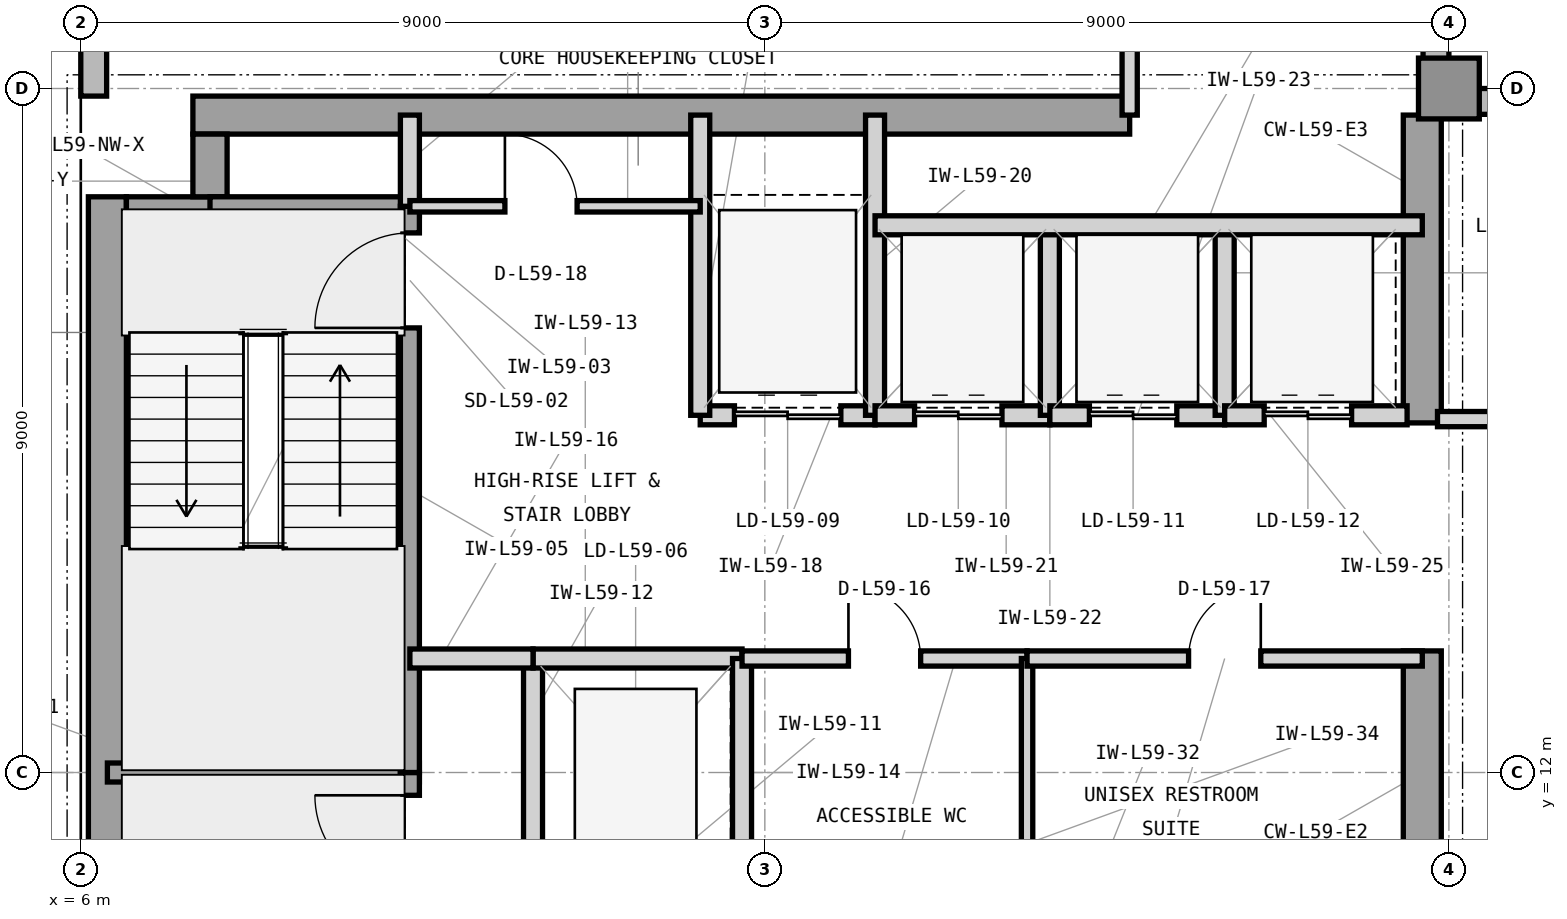
"""IFC4 building model, lengths in metres.
Left out: names, types, materials, properties, quantities, classifications, styles, units other than length and angle.
Written with IfcOpenShell. Run it as: python <this file> out.ifc"""

import sys

from ifc_helpers import new_model, si_unit, direction, frame, frame_2d, origin, origin_2d, place, context, subcontext, project, spatial, rectangle, extrude, element, fill, save


model = new_model("IFC4")
c1 = context("Model", 3, precision=1e-05, world=origin(), true_north=direction((0.0, 1.0)))
c2 = subcontext(c1, "Body", "Model", "MODEL_VIEW")
j1 = project(units=[si_unit("LENGTHUNIT", "METRE"), si_unit("PLANEANGLEUNIT", "RADIAN")], contexts=[c1])
p1 = place(None, origin())
s1 = spatial("IfcSite", under=j1, at=p1, CompositionType="ELEMENT")
p2 = place(p1, origin())
s2 = spatial("IfcBuilding", under=s1, at=p2, CompositionType="ELEMENT")
p3 = place(p2, frame((0.0, 0.0, 243.0)))
s3 = spatial("IfcBuildingStorey", under=s2, at=p3, CompositionType="ELEMENT", Elevation=243.0)
p4 = place(p3, frame((6.35, 4.425, 0.0), z_axis=(0.0, 0.0, 1.0), x_axis=(0.0, 1.0, 0.0)))
e1 = element("IfcWall", 1, at=p4, inside=s3, PredefinedType="SHEAR", context=c2, shape_type="SweptSolid", body=[
    extrude(rectangle(XDim=15.15, YDim=0.5, at=frame_2d((7.575, 0.0))), origin(), (0.0, 0.0, 1.0), 3.9),
])
p5 = place(p3, frame((7.475, 20.65, 0.0), z_axis=(0.0, 0.0, 1.0), x_axis=(1.0, 0.0, 0.0)))
e2 = element("IfcWall", 2, at=p5, inside=s3, PredefinedType="SHEAR", context=c2, shape_type="SweptSolid", body=[
    extrude(rectangle(XDim=12.325, YDim=0.5, at=frame_2d((6.163, 0.0))), origin(), (0.0, 0.0, 1.0), 3.9),
])
p6 = place(p3, frame((23.65, 10.4, 0.0), z_axis=(0.0, 0.0, 1.0), x_axis=(0.0, 1.0, 0.0)))
e3 = element("IfcWall", 3, at=p6, inside=s3, PredefinedType="SHEAR", context=c2, shape_type="SweptSolid", body=[
    extrude(rectangle(XDim=3.2, YDim=0.5, at=frame_2d((1.6, 0.0))), origin(), (0.0, 0.0, 1.0), 3.9),
])
p7 = place(p3, frame((23.65, 16.6, 0.0), z_axis=(0.0, 0.0, 1.0), x_axis=(0.0, 1.0, 0.0)))
e4 = element("IfcWall", 4, at=p7, inside=s3, PredefinedType="SHEAR", context=c2, shape_type="SweptSolid", body=[
    extrude(rectangle(XDim=4.05, YDim=0.5, at=frame_2d((2.025, 0.0))), origin(), (0.0, 0.0, 1.0), 3.9),
])
p8 = place(p3, frame((6.6, 19.35, 0.0), z_axis=(0.0, 0.0, 1.0), x_axis=(1.0, 0.0, 0.0)))
e5 = element("IfcWall", 5, at=p8, inside=s3, PredefinedType="SHEAR", context=c2, shape_type="SweptSolid", body=[
    extrude(rectangle(XDim=1.325, YDim=0.45, at=frame_2d((0.663, 0.0))), origin(), (0.0, 0.0, 1.0), 3.9),
])
p9 = place(p3, frame((7.7, 19.575, 0.0), z_axis=(0.0, 0.0, 1.0), x_axis=(0.0, 1.0, 0.0)))
e6 = element("IfcWall", 6, at=p9, inside=s3, PredefinedType="SHEAR", context=c2, shape_type="SweptSolid", body=[
    extrude(rectangle(XDim=0.825, YDim=0.45, at=frame_2d((0.413, 0.0))), origin(), (0.0, 0.0, 1.0), 3.9),
])
p10 = place(p3, frame((24.0, 21.0, 0.0), z_axis=(0.0, 0.0, 1.0), x_axis=(1.0, 0.0, 0.0)))
e7 = element("IfcColumn", 7, at=p10, inside=s3, PredefinedType="COLUMN", context=c2, shape_type="SweptSolid", body=[
    extrude(rectangle(XDim=0.8, YDim=0.8, at=origin_2d()), origin(), (0.0, 0.0, 1.0), 3.9),
])
p11 = place(p3, frame((52.4, 20.83, 0.0), z_axis=(0.0, 0.0, 1.0), x_axis=(-1.0, 0.0, 0.0)))
e8 = element("IfcWall", 8, at=p11, inside=s3, PredefinedType="STANDARD", context=c2, shape_type="SweptSolid", body=[
    extrude(rectangle(XDim=28.4, YDim=0.34, at=frame_2d((14.2, 0.0))), origin(), (0.0, 0.0, 1.0), 3.7),
])
p12 = place(p11, frame((26.096, 0.0, 0.9)))
e9 = element("IfcOpeningElement", 9, at=p12, cuts=e8, PredefinedType="OPENING", context=c2, shape_type="SweptSolid", body=[
    extrude(rectangle(XDim=1.6, YDim=2.2, at=frame_2d((0.8, 1.1))), frame((0.0, 0.18, 0.0), z_axis=(0.0, -1.0, 0.0), x_axis=(1.0, 0.0, 0.0)), (0.0, 0.0, 1.0), 0.36),
])
p13 = place(p11, frame((11.375, 0.0, 0.9)))
e10 = element("IfcOpeningElement", 10, at=p13, cuts=e8, PredefinedType="OPENING", context=c2, shape_type="SweptSolid", body=[
    extrude(rectangle(XDim=2.3, YDim=2.2, at=frame_2d((1.15, 1.1))), frame((0.0, 0.18, 0.0), z_axis=(0.0, -1.0, 0.0), x_axis=(1.0, 0.0, 0.0)), (0.0, 0.0, 1.0), 0.36),
])
p14 = place(p3, frame((23.83, 21.0, 0.0), z_axis=(0.0, 0.0, 1.0), x_axis=(0.0, 1.0, 0.0)))
e11 = element("IfcWall", 11, at=p14, inside=s3, PredefinedType="STANDARD", context=c2, shape_type="SweptSolid", body=[
    extrude(rectangle(XDim=19.4, YDim=0.34, at=frame_2d((9.7, 0.0))), origin(), (0.0, 0.0, 1.0), 3.7),
])
p15 = place(p14, frame((10.975, 0.0, 0.9)))
e12 = element("IfcOpeningElement", 12, at=p15, cuts=e11, PredefinedType="OPENING", context=c2, shape_type="SweptSolid", body=[
    extrude(rectangle(XDim=2.3, YDim=2.2, at=frame_2d((1.15, 1.1))), frame((0.0, 0.18, 0.0), z_axis=(0.0, -1.0, 0.0), x_axis=(1.0, 0.0, 0.0)), (0.0, 0.0, 1.0), 0.36),
])
p16 = place(p3, frame((6.17, 40.4, 0.0), z_axis=(0.0, 0.0, 1.0), x_axis=(0.0, -1.0, 0.0)))
e13 = element("IfcWall", 13, at=p16, inside=s3, PredefinedType="STANDARD", context=c2, shape_type="SweptSolid", body=[
    extrude(rectangle(XDim=19.5, YDim=0.34, at=frame_2d((9.75, 0.0))), origin(), (0.0, 0.0, 1.0), 3.7),
])
p17 = place(p16, frame((6.163, 0.0, 0.9)))
e14 = element("IfcOpeningElement", 14, at=p17, cuts=e13, PredefinedType="OPENING", context=c2, shape_type="SweptSolid", body=[
    extrude(rectangle(XDim=2.3, YDim=2.2, at=frame_2d((1.15, 1.1))), frame((0.0, 0.18, 0.0), z_axis=(0.0, -1.0, 0.0), x_axis=(1.0, 0.0, 0.0)), (0.0, 0.0, 1.0), 0.36),
])
p18 = place(p3, frame((6.35, 12.0, 0.0), z_axis=(0.0, 0.0, 1.0), x_axis=(1.0, 0.0, 0.0)))
e15 = element("IfcWall", 15, at=p18, inside=s3, PredefinedType="SHEAR", context=c2, shape_type="SweptSolid", body=[
    extrude(rectangle(XDim=4.105, YDim=0.25, at=frame_2d((2.052, 0.0))), origin(), (0.0, 0.0, 1.0), 3.9),
])
p19 = place(p3, frame((7.7, 19.45, 0.0), z_axis=(0.0, 0.0, 1.0), x_axis=(1.0, 0.0, 0.0)))
e16 = element("IfcWall", 16, at=p19, inside=s3, PredefinedType="SHEAR", context=c2, shape_type="SweptSolid", body=[
    extrude(rectangle(XDim=2.755, YDim=0.25, at=frame_2d((1.377, 0.0))), origin(), (0.0, 0.0, 1.0), 3.9),
])
p20 = place(p3, frame((10.33, 4.55, 0.0), z_axis=(0.0, 0.0, 1.0), x_axis=(0.0, 1.0, 0.0)))
e17 = element("IfcWall", 17, at=p20, inside=s3, PredefinedType="SHEAR", context=c2, shape_type="SweptSolid", body=[
    extrude(rectangle(XDim=7.45, YDim=0.25, at=frame_2d((3.725, 0.0))), origin(), (0.0, 0.0, 1.0), 3.9),
])
p21 = place(p20, frame((5.9, 0.0, 0.0)))
e18 = element("IfcOpeningElement", 18, at=p21, cuts=e17, PredefinedType="OPENING", context=c2, shape_type="SweptSolid", body=[
    extrude(rectangle(XDim=1.25, YDim=2.2, at=frame_2d((0.625, 1.1))), frame((0.0, 0.135, 0.0), z_axis=(0.0, -1.0, 0.0), x_axis=(1.0, 0.0, 0.0)), (0.0, 0.0, 1.0), 0.27),
])
p22 = place(p3, frame((10.33, 12.0, 0.0), z_axis=(0.0, 0.0, 1.0), x_axis=(0.0, 1.0, 0.0)))
e19 = element("IfcWall", 19, at=p22, inside=s3, PredefinedType="SHEAR", context=c2, shape_type="SweptSolid", body=[
    extrude(rectangle(XDim=7.45, YDim=0.25, at=frame_2d((3.725, 0.0))), origin(), (0.0, 0.0, 1.0), 3.9),
])
p23 = place(p22, frame((5.85, 0.0, 0.0)))
e20 = element("IfcOpeningElement", 20, at=p23, cuts=e19, PredefinedType="OPENING", context=c2, shape_type="SweptSolid", body=[
    extrude(rectangle(XDim=1.25, YDim=2.2, at=frame_2d((0.625, 1.1))), frame((0.0, 0.135, 0.0), z_axis=(0.0, -1.0, 0.0), x_axis=(1.0, 0.0, 0.0)), (0.0, 0.0, 1.0), 0.27),
])
p24 = place(p3, frame((10.33, 19.45, 0.0), z_axis=(0.0, 0.0, 1.0), x_axis=(0.0, 1.0, 0.0)))
e21 = element("IfcWall", 21, at=p24, inside=s3, PredefinedType="PARTITIONING", context=c2, shape_type="SweptSolid", body=[
    extrude(rectangle(XDim=1.2, YDim=0.25, at=frame_2d((0.6, 0.0))), origin(), (0.0, 0.0, 1.0), 3.69),
])
p25 = place(p3, frame((11.95, 10.5, 0.0), z_axis=(0.0, 0.0, 1.0), x_axis=(0.0, 1.0, 0.0)))
e22 = element("IfcWall", 22, at=p25, inside=s3, PredefinedType="PARTITIONING", context=c2, shape_type="SweptSolid", body=[
    extrude(rectangle(XDim=3.0, YDim=0.25, at=frame_2d((1.5, 0.0))), origin(), (0.0, 0.0, 1.0), 3.69),
])
p26 = place(p3, frame((11.95, 13.5, 0.0), z_axis=(0.0, 0.0, 1.0), x_axis=(1.0, 0.0, 0.0)))
e23 = element("IfcWall", 23, at=p26, inside=s3, PredefinedType="PARTITIONING", context=c2, shape_type="SweptSolid", body=[
    extrude(rectangle(XDim=2.75, YDim=0.25, at=frame_2d((1.375, 0.0))), origin(), (0.0, 0.0, 1.0), 3.073),
])
p27 = place(p3, frame((14.7, 10.5, 0.0), z_axis=(0.0, 0.0, 1.0), x_axis=(0.0, 1.0, 0.0)))
e24 = element("IfcWall", 24, at=p27, inside=s3, PredefinedType="PARTITIONING", context=c2, shape_type="SweptSolid", body=[
    extrude(rectangle(XDim=3.0, YDim=0.25, at=frame_2d((1.5, 0.0))), origin(), (0.0, 0.0, 1.0), 3.69),
])
p28 = place(p3, frame((10.33, 13.5, 0.0), z_axis=(0.0, 0.0, 1.0), x_axis=(1.0, 0.0, 0.0)))
e25 = element("IfcWall", 25, at=p28, inside=s3, PredefinedType="PARTITIONING", context=c2, shape_type="SweptSolid", body=[
    extrude(rectangle(XDim=1.62, YDim=0.25, at=frame_2d((0.81, 0.0))), origin(), (0.0, 0.0, 1.0), 3.073),
])
p29 = place(p3, frame((14.15, 16.7, 0.0), z_axis=(0.0, 0.0, 1.0), x_axis=(1.0, 0.0, 0.0)))
e26 = element("IfcWall", 26, at=p29, inside=s3, PredefinedType="PARTITIONING", context=c2, shape_type="SweptSolid", body=[
    extrude(rectangle(XDim=2.3, YDim=0.25, at=frame_2d((1.15, 0.0))), origin(), (0.0, 0.0, 1.0), 3.073),
])
p30 = place(p29, frame((0.45, 0.0, 0.0)))
e27 = element("IfcOpeningElement", 27, at=p30, cuts=e26, PredefinedType="OPENING", context=c2, shape_type="SweptSolid", body=[
    extrude(rectangle(XDim=1.4, YDim=2.35, at=frame_2d((0.7, 1.175))), frame((0.0, 0.135, 0.0), z_axis=(0.0, -1.0, 0.0), x_axis=(1.0, 0.0, 0.0)), (0.0, 0.0, 1.0), 0.27),
])
for number, where, z_axis, x_axis in (
    (28, (14.15, 16.7, 0.0), (0.0, 0.0, 1.0), (0.0, 1.0, 0.0)),
    (29, (16.45, 16.7, 0.0), (0.0, 0.0, 1.0), (0.0, 1.0, 0.0)),
):
    element("IfcWall", number, at=place(p3, frame(where, z_axis=z_axis, x_axis=x_axis)), inside=s3, PredefinedType="PARTITIONING", context=c2, shape_type="SweptSolid", body=[
        extrude(rectangle(XDim=3.95, YDim=0.25, at=frame_2d((1.975, 0.0))), origin(), (0.0, 0.0, 1.0), 3.69),
    ])
p31 = place(p3, frame((16.45, 16.7, 0.0), z_axis=(0.0, 0.0, 1.0), x_axis=(1.0, 0.0, 0.0)))
e30 = element("IfcWall", 30, at=p31, inside=s3, PredefinedType="PARTITIONING", context=c2, shape_type="SweptSolid", body=[
    extrude(rectangle(XDim=2.3, YDim=0.25, at=frame_2d((1.15, 0.0))), origin(), (0.0, 0.0, 1.0), 3.073),
])
p32 = place(p31, frame((0.52, 0.0, 0.0)))
e31 = element("IfcOpeningElement", 31, at=p32, cuts=e30, PredefinedType="OPENING", context=c2, shape_type="SweptSolid", body=[
    extrude(rectangle(XDim=1.15, YDim=2.25, at=frame_2d((0.575, 1.125))), frame((0.0, 0.135, 0.0), z_axis=(0.0, -1.0, 0.0), x_axis=(1.0, 0.0, 0.0)), (0.0, 0.0, 1.0), 0.27),
])
p33 = place(p3, frame((18.75, 16.7, 0.0), z_axis=(0.0, 0.0, 1.0), x_axis=(0.0, 1.0, 0.0)))
e32 = element("IfcWall", 32, at=p33, inside=s3, PredefinedType="PARTITIONING", context=c2, shape_type="SweptSolid", body=[
    extrude(rectangle(XDim=2.5, YDim=0.25, at=frame_2d((1.25, 0.0))), origin(), (0.0, 0.0, 1.0), 3.69),
])
p34 = place(p3, frame((18.75, 16.7, 0.0), z_axis=(0.0, 0.0, 1.0), x_axis=(1.0, 0.0, 0.0)))
e33 = element("IfcWall", 33, at=p34, inside=s3, PredefinedType="PARTITIONING", context=c2, shape_type="SweptSolid", body=[
    extrude(rectangle(XDim=2.3, YDim=0.25, at=frame_2d((1.15, 0.0))), origin(), (0.0, 0.0, 1.0), 3.073),
])
p35 = place(p34, frame((0.52, 0.0, 0.0)))
e34 = element("IfcOpeningElement", 34, at=p35, cuts=e33, PredefinedType="OPENING", context=c2, shape_type="SweptSolid", body=[
    extrude(rectangle(XDim=1.15, YDim=2.25, at=frame_2d((0.575, 1.125))), frame((0.0, 0.135, 0.0), z_axis=(0.0, -1.0, 0.0), x_axis=(1.0, 0.0, 0.0)), (0.0, 0.0, 1.0), 0.27),
])
p36 = place(p3, frame((21.05, 16.7, 0.0), z_axis=(0.0, 0.0, 1.0), x_axis=(0.0, 1.0, 0.0)))
e35 = element("IfcWall", 35, at=p36, inside=s3, PredefinedType="PARTITIONING", context=c2, shape_type="SweptSolid", body=[
    extrude(rectangle(XDim=2.5, YDim=0.25, at=frame_2d((1.25, 0.0))), origin(), (0.0, 0.0, 1.0), 3.69),
])
p37 = place(p3, frame((21.05, 16.7, 0.0), z_axis=(0.0, 0.0, 1.0), x_axis=(1.0, 0.0, 0.0)))
e36 = element("IfcWall", 36, at=p37, inside=s3, PredefinedType="PARTITIONING", context=c2, shape_type="SweptSolid", body=[
    extrude(rectangle(XDim=2.4, YDim=0.25, at=frame_2d((1.2, 0.0))), origin(), (0.0, 0.0, 1.0), 3.073),
])
p38 = place(p37, frame((0.52, 0.0, 0.0)))
e37 = element("IfcOpeningElement", 37, at=p38, cuts=e36, PredefinedType="OPENING", context=c2, shape_type="SweptSolid", body=[
    extrude(rectangle(XDim=1.15, YDim=2.25, at=frame_2d((0.575, 1.125))), frame((0.0, 0.135, 0.0), z_axis=(0.0, -1.0, 0.0), x_axis=(1.0, 0.0, 0.0)), (0.0, 0.0, 1.0), 0.27),
])
p39 = place(p3, frame((16.45, 19.2, 0.0), z_axis=(0.0, 0.0, 1.0), x_axis=(1.0, 0.0, 0.0)))
e38 = element("IfcWall", 38, at=p39, inside=s3, PredefinedType="PARTITIONING", context=c2, shape_type="SweptSolid", body=[
    extrude(rectangle(XDim=7.2, YDim=0.25, at=frame_2d((3.6, 0.0))), origin(), (0.0, 0.0, 1.0), 3.69),
])
p40 = place(p3, frame((14.7, 13.5, 0.0), z_axis=(0.0, 0.0, 1.0), x_axis=(1.0, 0.0, 0.0)))
e39 = element("IfcWall", 39, at=p40, inside=s3, PredefinedType="PARTITIONING", context=c2, shape_type="SweptSolid", body=[
    extrude(rectangle(XDim=3.75, YDim=0.2, at=frame_2d((1.875, 0.0))), origin(), (0.0, 0.0, 1.0), 3.073),
])
p41 = place(p40, frame((1.4, 0.0, 0.0)))
e40 = element("IfcOpeningElement", 40, at=p41, cuts=e39, PredefinedType="OPENING", context=c2, shape_type="SweptSolid", body=[
    extrude(rectangle(XDim=0.95, YDim=2.1, at=frame_2d((0.475, 1.05))), frame((0.0, 0.11, 0.0), z_axis=(0.0, -1.0, 0.0), x_axis=(1.0, 0.0, 0.0)), (0.0, 0.0, 1.0), 0.22),
])
p42 = place(p3, frame((18.45, 10.25, 0.0), z_axis=(0.0, 0.0, 1.0), x_axis=(0.0, 1.0, 0.0)))
e41 = element("IfcWall", 41, at=p42, inside=s3, PredefinedType="PARTITIONING", context=c2, shape_type="SweptSolid", body=[
    extrude(rectangle(XDim=3.25, YDim=0.15, at=frame_2d((1.625, 0.0))), origin(), (0.0, 0.0, 1.0), 3.69),
])
p43 = place(p3, frame((18.45, 13.5, 0.0), z_axis=(0.0, 0.0, 1.0), x_axis=(1.0, 0.0, 0.0)))
e42 = element("IfcWall", 42, at=p43, inside=s3, PredefinedType="PARTITIONING", context=c2, shape_type="SweptSolid", body=[
    extrude(rectangle(XDim=5.2, YDim=0.2, at=frame_2d((2.6, 0.0))), origin(), (0.0, 0.0, 1.0), 3.073),
])
p44 = place(p43, frame((2.125, 0.0, 0.0)))
e43 = element("IfcOpeningElement", 43, at=p44, cuts=e42, PredefinedType="OPENING", context=c2, shape_type="SweptSolid", body=[
    extrude(rectangle(XDim=0.95, YDim=2.1, at=frame_2d((0.475, 1.05))), frame((0.0, 0.11, 0.0), z_axis=(0.0, -1.0, 0.0), x_axis=(1.0, 0.0, 0.0)), (0.0, 0.0, 1.0), 0.22),
])
p45 = place(p3, frame((10.33, 19.45, 0.0), z_axis=(0.0, 0.0, 1.0), x_axis=(1.0, 0.0, 0.0)))
e44 = element("IfcWall", 44, at=p45, inside=s3, PredefinedType="PARTITIONING", context=c2, shape_type="SweptSolid", body=[
    extrude(rectangle(XDim=3.82, YDim=0.15, at=frame_2d((1.91, 0.0))), origin(), (0.0, 0.0, 1.0), 3.69),
])
p46 = place(p45, frame((1.25, 0.0, 0.0)))
e45 = element("IfcOpeningElement", 45, at=p46, cuts=e44, PredefinedType="OPENING", context=c2, shape_type="SweptSolid", body=[
    extrude(rectangle(XDim=0.95, YDim=2.1, at=frame_2d((0.475, 1.05))), frame((0.0, 0.085, 0.0), z_axis=(0.0, -1.0, 0.0), x_axis=(1.0, 0.0, 0.0)), (0.0, 0.0, 1.0), 0.17),
])
p47 = place(p3, frame((23.85, 16.65, 0.0), z_axis=(0.0, 0.0, 1.0), x_axis=(1.0, 0.0, 0.0)))
e46 = element("IfcWall", 46, at=p47, inside=s3, PredefinedType="PARTITIONING", context=c2, shape_type="SweptSolid", body=[
    extrude(rectangle(XDim=2.85, YDim=0.2, at=frame_2d((1.425, 0.0))), origin(), (0.0, 0.0, 1.0), 3.69),
])
p48 = place(p47, frame((0.7, 0.0, 0.0)))
e47 = element("IfcOpeningElement", 47, at=p48, cuts=e46, PredefinedType="OPENING", context=c2, shape_type="SweptSolid", body=[
    extrude(rectangle(XDim=1.0, YDim=2.15, at=frame_2d((0.5, 1.075))), frame((0.0, 0.11, 0.0), z_axis=(0.0, -1.0, 0.0), x_axis=(1.0, 0.0, 0.0)), (0.0, 0.0, 1.0), 0.22),
])
p49 = place(p3, frame((19.8, 20.65, 0.0), z_axis=(0.0, 0.0, 1.0), x_axis=(0.0, 1.0, 0.0)))
e48 = element("IfcWall", 48, at=p49, inside=s3, PredefinedType="PARTITIONING", context=c2, shape_type="SweptSolid", body=[
    extrude(rectangle(XDim=6.15, YDim=0.2, at=frame_2d((3.075, 0.0))), origin(), (0.0, 0.0, 1.0), 3.69),
])
p50 = place(p21, origin())
e49 = element("IfcDoor", 49, at=p50, inside=s3, OperationType="SINGLE_SWING_RIGHT", PredefinedType="DOOR", context=c2, shape_type="SweptSolid", body=[
    extrude(rectangle(XDim=1.25, YDim=2.2, at=frame_2d((0.625, 1.1))), frame((0.0, 0.025, 0.0), z_axis=(0.0, -1.0, 0.0), x_axis=(1.0, 0.0, 0.0)), (0.0, 0.0, 1.0), 0.05),
])
fill(e18, e49)
p51 = place(p23, origin())
e50 = element("IfcDoor", 50, at=p51, inside=s3, OperationType="SINGLE_SWING_LEFT", PredefinedType="DOOR", context=c2, shape_type="SweptSolid", body=[
    extrude(rectangle(XDim=1.25, YDim=2.2, at=frame_2d((0.625, 1.1))), frame((0.0, 0.025, 0.0), z_axis=(0.0, -1.0, 0.0), x_axis=(1.0, 0.0, 0.0)), (0.0, 0.0, 1.0), 0.05),
])
fill(e20, e50)
p52 = place(p30, origin())
e51 = element("IfcDoor", 51, at=p52, inside=s3, OperationType="DOUBLE_DOOR_SLIDING", PredefinedType="DOOR", context=c2, shape_type="SweptSolid", body=[
    extrude(rectangle(XDim=1.4, YDim=2.35, at=frame_2d((0.7, 1.175))), frame((0.0, 0.025, 0.0), z_axis=(0.0, -1.0, 0.0), x_axis=(1.0, 0.0, 0.0)), (0.0, 0.0, 1.0), 0.05),
])
fill(e27, e51)
p53 = place(p32, origin())
e52 = element("IfcDoor", 52, at=p53, inside=s3, OperationType="DOUBLE_DOOR_SLIDING", PredefinedType="DOOR", context=c2, shape_type="SweptSolid", body=[
    extrude(rectangle(XDim=1.15, YDim=2.25, at=frame_2d((0.575, 1.125))), frame((0.0, 0.025, 0.0), z_axis=(0.0, -1.0, 0.0), x_axis=(1.0, 0.0, 0.0)), (0.0, 0.0, 1.0), 0.05),
])
fill(e31, e52)
p54 = place(p35, origin())
e53 = element("IfcDoor", 53, at=p54, inside=s3, OperationType="DOUBLE_DOOR_SLIDING", PredefinedType="DOOR", context=c2, shape_type="SweptSolid", body=[
    extrude(rectangle(XDim=1.15, YDim=2.25, at=frame_2d((0.575, 1.125))), frame((0.0, 0.025, 0.0), z_axis=(0.0, -1.0, 0.0), x_axis=(1.0, 0.0, 0.0)), (0.0, 0.0, 1.0), 0.05),
])
fill(e34, e53)
p55 = place(p38, origin())
e54 = element("IfcDoor", 54, at=p55, inside=s3, OperationType="DOUBLE_DOOR_SLIDING", PredefinedType="DOOR", context=c2, shape_type="SweptSolid", body=[
    extrude(rectangle(XDim=1.15, YDim=2.25, at=frame_2d((0.575, 1.125))), frame((0.0, 0.025, 0.0), z_axis=(0.0, -1.0, 0.0), x_axis=(1.0, 0.0, 0.0)), (0.0, 0.0, 1.0), 0.05),
])
fill(e37, e54)
p56 = place(p41, origin())
e55 = element("IfcDoor", 55, at=p56, inside=s3, OperationType="SINGLE_SWING_LEFT", PredefinedType="DOOR", context=c2, shape_type="SweptSolid", body=[
    extrude(rectangle(XDim=0.95, YDim=2.1, at=frame_2d((0.475, 1.05))), frame((0.0, 0.025, 0.0), z_axis=(0.0, -1.0, 0.0), x_axis=(1.0, 0.0, 0.0)), (0.0, 0.0, 1.0), 0.05),
])
fill(e40, e55)
p57 = place(p44, origin())
e56 = element("IfcDoor", 56, at=p57, inside=s3, OperationType="SINGLE_SWING_RIGHT", PredefinedType="DOOR", context=c2, shape_type="SweptSolid", body=[
    extrude(rectangle(XDim=0.95, YDim=2.1, at=frame_2d((0.475, 1.05))), frame((0.0, 0.025, 0.0), z_axis=(0.0, -1.0, 0.0), x_axis=(1.0, 0.0, 0.0)), (0.0, 0.0, 1.0), 0.05),
])
fill(e43, e56)
p58 = place(p46, origin())
e57 = element("IfcDoor", 57, at=p58, inside=s3, OperationType="SINGLE_SWING_LEFT", PredefinedType="DOOR", context=c2, shape_type="SweptSolid", body=[
    extrude(rectangle(XDim=0.95, YDim=2.1, at=frame_2d((0.475, 1.05))), frame((0.0, 0.025, 0.0), z_axis=(0.0, -1.0, 0.0), x_axis=(1.0, 0.0, 0.0)), (0.0, 0.0, 1.0), 0.05),
])
fill(e45, e57)
save(model, sys.argv[1])
